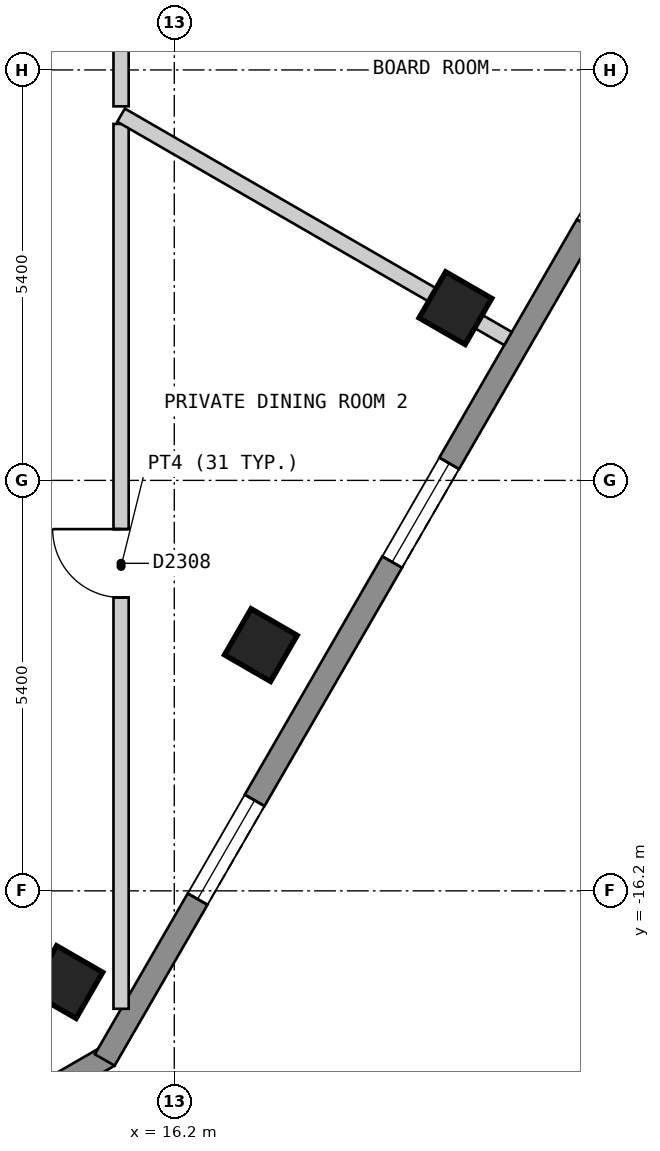
"""IFC4 building model, lengths in metres.
Left out: names, types, materials, properties, quantities, classifications, styles, units other than length and angle.
Written with IfcOpenShell. Run it as: python <this file> out.ifc"""

import sys

from ifc_helpers import new_model, si_unit, direction, frame, frame_2d, origin, origin_2d, place, context, subcontext, project, spatial, polyline, rectangle, outline, extrude, element, fill, save


model = new_model("IFC4")
c1 = context("Model", 3, precision=1e-05, world=origin(), true_north=direction((0.0, 1.0)))
c2 = subcontext(c1, "Body", "Model", "MODEL_VIEW")
j1 = project(units=[si_unit("LENGTHUNIT", "METRE"), si_unit("PLANEANGLEUNIT", "RADIAN")], contexts=[c1])
p1 = place(None, origin())
s1 = spatial("IfcSite", under=j1, at=p1, CompositionType="ELEMENT")
p2 = place(p1, origin())
s2 = spatial("IfcBuilding", under=s1, at=p2, CompositionType="ELEMENT")
p3 = place(p2, frame((0.0, 0.0, 241.8)))
s3 = spatial("IfcBuildingStorey", under=s2, at=p3, CompositionType="ELEMENT", Elevation=241.8)
for number, where, z_axis, x_axis in (
    (1, (14.78, -17.4, 0.0), (0.0, 0.0, 1.0), (0.5, 0.866, 0.0)),
    (2, (17.339, -12.967, 0.0), (0.0, 0.0, 1.0), (0.5, 0.866, 0.0)),
    (3, (19.899, -8.534, 0.0), (0.0, 0.0, 1.0), (0.5, 0.866, 0.0)),
):
    element("IfcColumn", number, at=place(p3, frame(where, z_axis=z_axis, x_axis=x_axis)), inside=s3, PredefinedType="COLUMN", context=c2, shape_type="SweptSolid", body=[
        extrude(rectangle(XDim=0.7, YDim=0.7, at=origin_2d()), origin(), (0.0, 0.0, 1.0), 3.0),
    ])
p4 = place(p3, frame((11.01, -20.87, 0.0), z_axis=(0.0, 0.0, 1.0), x_axis=(0.866022959057, 0.500004234368, 0.0)))
e4 = element("IfcWall", 4, at=p4, inside=s3, PredefinedType="SOLIDWALL", context=c2, shape_type="SweptSolid", body=[
    extrude(outline(polyline([(0.0, -0.15), (5.0, -0.15), (4.92, 0.15), (0.08, 0.15), (0.0, -0.15)])), origin(), (0.0, 0.0, 1.0), 2.2),
])
p5 = place(p4, frame((0.65, 0.0, 0.15)))
e5 = element("IfcOpeningElement", 5, at=p5, cuts=e4, PredefinedType="OPENING", context=c2, shape_type="SweptSolid", body=[
    extrude(rectangle(XDim=1.2, YDim=2.1, at=frame_2d((0.6, 1.05))), frame((0.0, 0.16, 0.0), z_axis=(0.0, -1.0, 0.0), x_axis=(1.0, 0.0, 0.0)), (0.0, 0.0, 1.0), 0.32),
])
p6 = place(p3, frame((15.285, -18.425, 0.0), z_axis=(0.0, 0.0, 1.0), x_axis=(0.500012653391, 0.866018098222, 0.0)))
e6 = element("IfcWall", 6, at=p6, inside=s3, PredefinedType="SOLIDWALL", context=c2, shape_type="SweptSolid", body=[
    extrude(outline(polyline([(0.0, -0.15), (16.628, -0.15), (16.548, 0.15), (0.08, 0.15), (0.0, -0.15)])), origin(), (0.0, 0.0, 1.0), 2.2),
])
p7 = place(p6, frame((2.444, 0.0, 0.15)))
e7 = element("IfcOpeningElement", 7, at=p7, cuts=e6, PredefinedType="OPENING", context=c2, shape_type="SweptSolid", body=[
    extrude(rectangle(XDim=1.5, YDim=2.1, at=frame_2d((0.75, 1.05))), frame((0.0, 0.16, 0.0), z_axis=(0.0, -1.0, 0.0), x_axis=(1.0, 0.0, 0.0)), (0.0, 0.0, 1.0), 0.32),
])
p8 = place(p6, frame((7.564, 0.0, 0.15)))
e8 = element("IfcOpeningElement", 8, at=p8, cuts=e6, PredefinedType="OPENING", context=c2, shape_type="SweptSolid", body=[
    extrude(rectangle(XDim=1.5, YDim=2.1, at=frame_2d((0.75, 1.05))), frame((0.0, 0.16, 0.0), z_axis=(0.0, -1.0, 0.0), x_axis=(1.0, 0.0, 0.0)), (0.0, 0.0, 1.0), 0.32),
])
p9 = place(p6, frame((12.682, 0.0, 0.15)))
e9 = element("IfcOpeningElement", 9, at=p9, cuts=e6, PredefinedType="OPENING", context=c2, shape_type="SweptSolid", body=[
    extrude(rectangle(XDim=1.5, YDim=2.1, at=frame_2d((0.75, 1.05))), frame((0.0, 0.16, 0.0), z_axis=(0.0, -1.0, 0.0), x_axis=(1.0, 0.0, 0.0)), (0.0, 0.0, 1.0), 0.32),
])
p10 = place(p3, frame((15.5, -2.357, 0.0), z_axis=(0.0, 0.0, 1.0), x_axis=(0.0, -1.0, 0.0)))
e10 = element("IfcWall", 10, at=p10, inside=s3, PredefinedType="PARTITIONING", context=c2, shape_type="SweptSolid", body=[
    extrude(rectangle(XDim=3.522, YDim=0.2, at=frame_2d((1.761, 0.0))), origin(), (0.0, 0.0, 1.0), 2.2),
])
p11 = place(p10, frame((1.008, 0.0, 0.0)))
e11 = element("IfcOpeningElement", 11, at=p11, cuts=e10, PredefinedType="OPENING", context=c2, shape_type="SweptSolid", body=[
    extrude(rectangle(XDim=0.9, YDim=2.1, at=frame_2d((0.45, 1.05))), frame((0.0, 0.11, 0.0), z_axis=(0.0, -1.0, 0.0), x_axis=(1.0, 0.0, 0.0)), (0.0, 0.0, 1.0), 0.22),
])
p12 = place(p3, frame((15.5, -17.752, 0.0), z_axis=(0.0, 0.0, 1.0), x_axis=(0.0, 1.0, 0.0)))
e12 = element("IfcWall", 12, at=p12, inside=s3, PredefinedType="PARTITIONING", context=c2, shape_type="SweptSolid", body=[
    extrude(rectangle(XDim=11.642, YDim=0.2, at=frame_2d((5.821, 0.0))), origin(), (0.0, 0.0, 1.0), 2.2),
])
p13 = place(p12, frame((5.411, 0.0, 0.0)))
e13 = element("IfcOpeningElement", 13, at=p13, cuts=e12, PredefinedType="OPENING", context=c2, shape_type="SweptSolid", body=[
    extrude(rectangle(XDim=0.9, YDim=2.1, at=frame_2d((0.45, 1.05))), frame((0.0, 0.11, 0.0), z_axis=(0.0, -1.0, 0.0), x_axis=(1.0, 0.0, 0.0)), (0.0, 0.0, 1.0), 0.22),
])
p14 = place(p3, frame((15.5, -5.995, 0.0), z_axis=(0.0, 0.0, 1.0), x_axis=(0.866052111102, -0.499953738716, 0.0)))
e14 = element("IfcWall", 14, at=p14, inside=s3, PredefinedType="PARTITIONING", context=c2, shape_type="SweptSolid", body=[
    extrude(rectangle(XDim=5.878, YDim=0.2, at=frame_2d((2.939, 0.0))), origin(), (0.0, 0.0, 1.0), 2.2),
])
p15 = place(p7, origin())
e15 = element("IfcWindow", 15, at=p15, inside=s3, PartitioningType="SINGLE_PANEL", PredefinedType="WINDOW", context=c2, shape_type="SweptSolid", body=[
    extrude(rectangle(XDim=1.5, YDim=2.1, at=frame_2d((0.75, 1.05))), frame((0.0, 0.03, 0.0), z_axis=(0.0, -1.0, 0.0), x_axis=(1.0, 0.0, 0.0)), (0.0, 0.0, 1.0), 0.06),
])
fill(e7, e15)
p16 = place(p8, origin())
e16 = element("IfcWindow", 16, at=p16, inside=s3, PartitioningType="SINGLE_PANEL", PredefinedType="WINDOW", context=c2, shape_type="SweptSolid", body=[
    extrude(rectangle(XDim=1.5, YDim=2.1, at=frame_2d((0.75, 1.05))), frame((0.0, 0.03, 0.0), z_axis=(0.0, -1.0, 0.0), x_axis=(1.0, 0.0, 0.0)), (0.0, 0.0, 1.0), 0.06),
])
fill(e8, e16)
p17 = place(p13, origin())
e17 = element("IfcDoor", 17, at=p17, inside=s3, OperationType="SINGLE_SWING_RIGHT", PredefinedType="DOOR", context=c2, shape_type="SweptSolid", body=[
    extrude(rectangle(XDim=0.9, YDim=2.1, at=frame_2d((0.45, 1.05))), frame((0.0, 0.025, 0.0), z_axis=(0.0, -1.0, 0.0), x_axis=(1.0, 0.0, 0.0)), (0.0, 0.0, 1.0), 0.05),
])
fill(e13, e17)
save(model, sys.argv[1])
